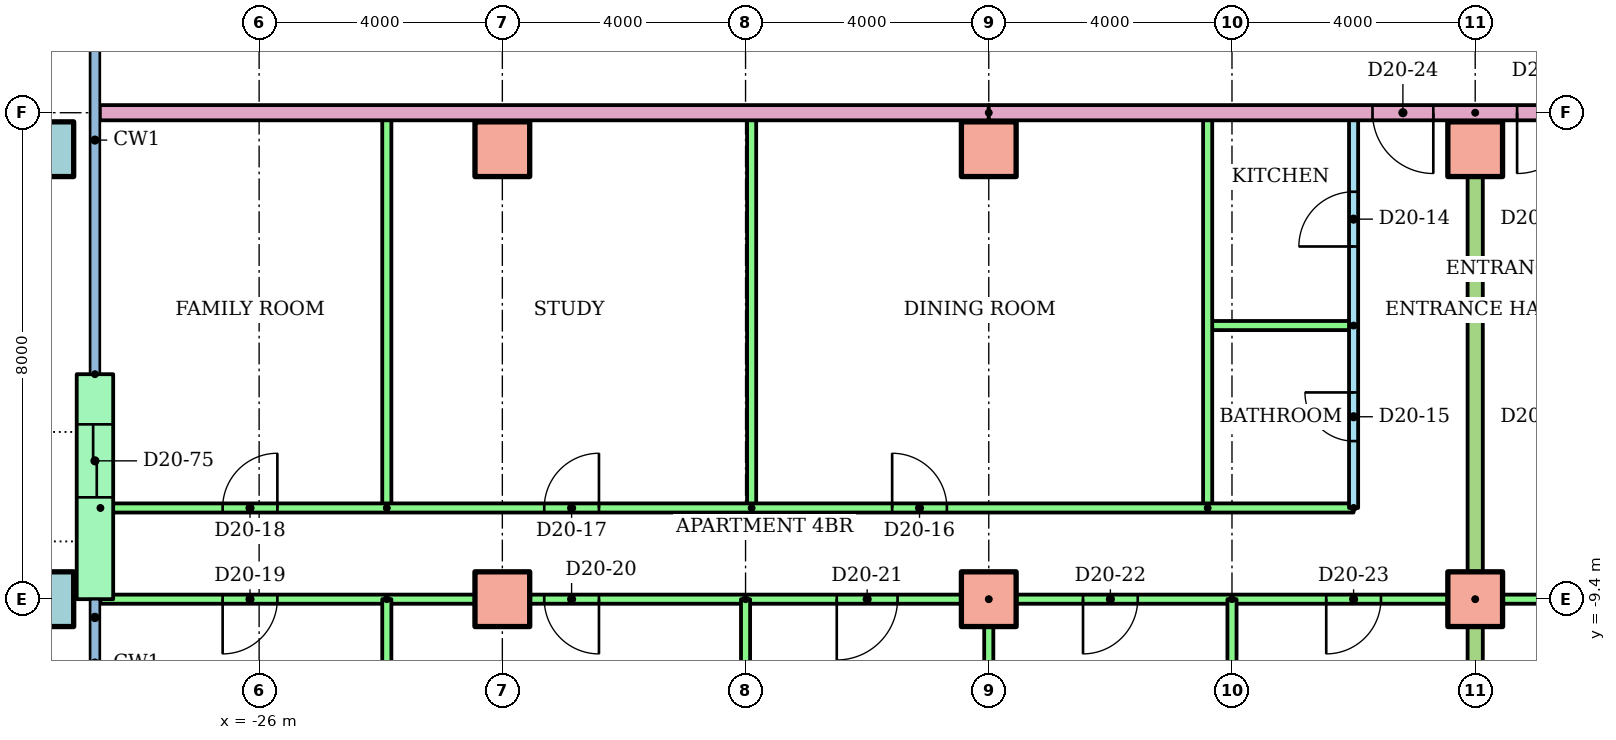
"""IFC4 building model, lengths in metres.
Left out: names, types, materials, properties, quantities, classifications, styles, units other than length and angle.
Written with IfcOpenShell. Run it as: python <this file> out.ifc"""

import sys

from ifc_helpers import new_model, si_unit, direction, frame, frame_2d, origin, origin_2d, place, context, subcontext, project, spatial, rectangle, hollow_rectangle, extrude, element, fill, save


model = new_model("IFC4")
c1 = context("Model", 3, precision=1e-05, world=origin(), true_north=direction((0.0, 1.0)))
c2 = subcontext(c1, "Body", "Model", "MODEL_VIEW")
j1 = project(units=[si_unit("LENGTHUNIT", "METRE"), si_unit("PLANEANGLEUNIT", "RADIAN")], contexts=[c1])
p1 = place(None, origin())
s1 = spatial("IfcSite", under=j1, at=p1, CompositionType="ELEMENT")
p2 = place(p1, origin())
s2 = spatial("IfcBuilding", under=s1, at=p2, CompositionType="ELEMENT")
p3 = place(p2, frame((0.0, 0.0, 80.7)))
s3 = spatial("IfcBuildingStorey", under=s2, at=p3, CompositionType="ELEMENT", Elevation=80.7)
p4 = place(p3, frame((-29.5, -9.4, 0.0)))
e1 = element("IfcColumn", 1, at=p4, inside=s3, PredefinedType="COLUMN", context=c2, shape_type="SweptSolid", body=[
    extrude(hollow_rectangle(XDim=0.9, YDim=0.9, WallThickness=0.045, at=origin_2d()), origin(), (0.0, 0.0, 1.0), 3.2),
])
for number, where in (
    (2, (-22.0, -9.4, 0.0)),
    (3, (-14.0, -9.4, 0.0)),
    (4, (-6.0, -9.4, 0.0)),
):
    element("IfcColumn", number, at=place(p3, frame(where)), inside=s3, PredefinedType="COLUMN", context=c2, shape_type="SweptSolid", body=[
        extrude(rectangle(XDim=0.9, YDim=0.9, at=origin_2d()), origin(), (0.0, 0.0, 1.0), 3.2),
    ])
p5 = place(p3, frame((-29.5, -2.0, 0.0)))
e5 = element("IfcColumn", 5, at=p5, inside=s3, PredefinedType="COLUMN", context=c2, shape_type="SweptSolid", body=[
    extrude(hollow_rectangle(XDim=0.9, YDim=0.9, WallThickness=0.045, at=origin_2d()), origin(), (0.0, 0.0, 1.0), 3.2),
])
for number, where in (
    (6, (-22.0, -2.0, 0.0)),
    (7, (-14.0, -2.0, 0.0)),
    (8, (-6.0, -2.0, 0.0)),
):
    element("IfcColumn", number, at=place(p3, frame(where)), inside=s3, PredefinedType="COLUMN", context=c2, shape_type="SweptSolid", body=[
        extrude(rectangle(XDim=0.9, YDim=0.9, at=origin_2d()), origin(), (0.0, 0.0, 1.0), 3.2),
    ])
p6 = place(p3, frame((-28.7, -5.7, 0.0), z_axis=(0.0, 0.0, 1.0), x_axis=(0.0, -1.0, 0.0)))
e9 = element("IfcWall", 9, at=p6, inside=s3, PredefinedType="STANDARD", context=c2, shape_type="SweptSolid", body=[
    extrude(rectangle(XDim=3.7, YDim=0.6, at=frame_2d((1.85, 0.0))), origin(), (0.0, 0.0, 1.0), 2.92),
])
p7 = place(p6, frame((0.825, 0.0, 0.0)))
e10 = element("IfcOpeningElement", 10, at=p7, cuts=e9, PredefinedType="OPENING", context=c2, shape_type="SweptSolid", body=[
    extrude(rectangle(XDim=1.2, YDim=2.1, at=frame_2d((0.6, 1.05))), frame((0.0, 0.31, 0.0), z_axis=(0.0, -1.0, 0.0), x_axis=(1.0, 0.0, 0.0)), (0.0, 0.0, 1.0), 0.62),
])
p8 = place(p3, frame((-8.0, -7.9, 0.0), z_axis=(0.0, 0.0, 1.0), x_axis=(0.0, 1.0, 0.0)))
e11 = element("IfcWall", 11, at=p8, inside=s3, PredefinedType="PARTITIONING", context=c2, shape_type="SweptSolid", body=[
    extrude(rectangle(XDim=6.5, YDim=0.15, at=frame_2d((3.25, 0.0))), origin(), (0.0, 0.0, 1.0), 2.4),
])
p9 = place(p8, frame((4.3, 0.0, 0.0)))
e12 = element("IfcOpeningElement", 12, at=p9, cuts=e11, PredefinedType="OPENING", context=c2, shape_type="SweptSolid", body=[
    extrude(rectangle(XDim=0.9, YDim=2.1, at=frame_2d((0.45, 1.05))), frame((0.0, 0.085, 0.0), z_axis=(0.0, -1.0, 0.0), x_axis=(1.0, 0.0, 0.0)), (0.0, 0.0, 1.0), 0.17),
])
p10 = place(p8, frame((1.1, 0.0, 0.0)))
e13 = element("IfcOpeningElement", 13, at=p10, cuts=e11, PredefinedType="OPENING", context=c2, shape_type="SweptSolid", body=[
    extrude(rectangle(XDim=0.8, YDim=2.1, at=frame_2d((0.4, 1.05))), frame((0.0, 0.085, 0.0), z_axis=(0.0, -1.0, 0.0), x_axis=(1.0, 0.0, 0.0)), (0.0, 0.0, 1.0), 0.17),
])
p11 = place(p3, frame((-8.0, -4.9, 0.0), z_axis=(0.0, 0.0, 1.0), x_axis=(-1.0, 0.0, 0.0)))
e14 = element("IfcWall", 14, at=p11, inside=s3, PredefinedType="PARTITIONING", context=c2, shape_type="SweptSolid", body=[
    extrude(rectangle(XDim=2.4, YDim=0.15, at=frame_2d((1.2, 0.0))), origin(), (0.0, 0.0, 1.0), 2.4),
])
for number, where, z_axis, x_axis in (
    (15, (-10.4, -7.9, 0.0), (0.0, 0.0, 1.0), (0.0, 1.0, 0.0)),
    (16, (-17.9, -7.9, 0.0), (0.0, 0.0, 1.0), (0.0, 1.0, 0.0)),
    (17, (-23.9, -7.9, 0.0), (0.0, 0.0, 1.0), (0.0, 1.0, 0.0)),
):
    element("IfcWall", number, at=place(p3, frame(where, z_axis=z_axis, x_axis=x_axis)), inside=s3, PredefinedType="PARTITIONING", context=c2, shape_type="SweptSolid", body=[
        extrude(rectangle(XDim=6.5, YDim=0.15, at=frame_2d((3.25, 0.0))), origin(), (0.0, 0.0, 1.0), 2.4),
    ])
p12 = place(p3, frame((-28.61, -7.9, 0.0)))
e18 = element("IfcWall", 18, at=p12, inside=s3, PredefinedType="PARTITIONING", context=c2, shape_type="SweptSolid", body=[
    extrude(rectangle(XDim=20.61, YDim=0.15, at=frame_2d((10.305, 0.0))), origin(), (0.0, 0.0, 1.0), 2.4),
])
p13 = place(p12, frame((13.021, 0.0, 0.0)))
e19 = element("IfcOpeningElement", 19, at=p13, cuts=e18, PredefinedType="OPENING", context=c2, shape_type="SweptSolid", body=[
    extrude(rectangle(XDim=0.9, YDim=2.1, at=frame_2d((0.45, 1.05))), frame((0.0, 0.085, 0.0), z_axis=(0.0, -1.0, 0.0), x_axis=(1.0, 0.0, 0.0)), (0.0, 0.0, 1.0), 0.17),
])
p14 = place(p12, frame((7.299, 0.0, 0.0)))
e20 = element("IfcOpeningElement", 20, at=p14, cuts=e18, PredefinedType="OPENING", context=c2, shape_type="SweptSolid", body=[
    extrude(rectangle(XDim=0.9, YDim=2.1, at=frame_2d((0.45, 1.05))), frame((0.0, 0.085, 0.0), z_axis=(0.0, -1.0, 0.0), x_axis=(1.0, 0.0, 0.0)), (0.0, 0.0, 1.0), 0.17),
])
p15 = place(p12, frame((2.01, 0.0, 0.0)))
e21 = element("IfcOpeningElement", 21, at=p15, cuts=e18, PredefinedType="OPENING", context=c2, shape_type="SweptSolid", body=[
    extrude(rectangle(XDim=0.9, YDim=2.1, at=frame_2d((0.45, 1.05))), frame((0.0, 0.085, 0.0), z_axis=(0.0, -1.0, 0.0), x_axis=(1.0, 0.0, 0.0)), (0.0, 0.0, 1.0), 0.17),
])
p16 = place(p3, frame((-6.0, -9.4, 0.0), z_axis=(0.0, 0.0, 1.0), x_axis=(-1.0, 0.0, 0.0)))
e22 = element("IfcWall", 22, at=p16, inside=s3, PredefinedType="PARTITIONING", context=c2, shape_type="SweptSolid", body=[
    extrude(rectangle(XDim=22.61, YDim=0.15, at=frame_2d((11.305, 0.0))), origin(), (0.0, 0.0, 1.0), 2.4),
])
p17 = place(p16, frame((19.7, 0.0, 0.0)))
e23 = element("IfcOpeningElement", 23, at=p17, cuts=e22, PredefinedType="OPENING", context=c2, shape_type="SweptSolid", body=[
    extrude(rectangle(XDim=0.9, YDim=2.1, at=frame_2d((0.45, 1.05))), frame((0.0, 0.085, 0.0), z_axis=(0.0, -1.0, 0.0), x_axis=(1.0, 0.0, 0.0)), (0.0, 0.0, 1.0), 0.17),
])
p18 = place(p16, frame((14.411, 0.0, 0.0)))
e24 = element("IfcOpeningElement", 24, at=p18, cuts=e22, PredefinedType="OPENING", context=c2, shape_type="SweptSolid", body=[
    extrude(rectangle(XDim=0.9, YDim=2.1, at=frame_2d((0.45, 1.05))), frame((0.0, 0.085, 0.0), z_axis=(0.0, -1.0, 0.0), x_axis=(1.0, 0.0, 0.0)), (0.0, 0.0, 1.0), 0.17),
])
p19 = place(p16, frame((9.5, 0.0, 0.0)))
e25 = element("IfcOpeningElement", 25, at=p19, cuts=e22, PredefinedType="OPENING", context=c2, shape_type="SweptSolid", body=[
    extrude(rectangle(XDim=1.0, YDim=2.1, at=frame_2d((0.5, 1.05))), frame((0.0, 0.085, 0.0), z_axis=(0.0, -1.0, 0.0), x_axis=(1.0, 0.0, 0.0)), (0.0, 0.0, 1.0), 0.17),
])
p20 = place(p16, frame((5.55, 0.0, 0.0)))
e26 = element("IfcOpeningElement", 26, at=p20, cuts=e22, PredefinedType="OPENING", context=c2, shape_type="SweptSolid", body=[
    extrude(rectangle(XDim=0.9, YDim=2.1, at=frame_2d((0.45, 1.05))), frame((0.0, 0.085, 0.0), z_axis=(0.0, -1.0, 0.0), x_axis=(1.0, 0.0, 0.0)), (0.0, 0.0, 1.0), 0.17),
])
p21 = place(p16, frame((1.55, 0.0, 0.0)))
e27 = element("IfcOpeningElement", 27, at=p21, cuts=e22, PredefinedType="OPENING", context=c2, shape_type="SweptSolid", body=[
    extrude(rectangle(XDim=0.9, YDim=2.1, at=frame_2d((0.45, 1.05))), frame((0.0, 0.085, 0.0), z_axis=(0.0, -1.0, 0.0), x_axis=(1.0, 0.0, 0.0)), (0.0, 0.0, 1.0), 0.17),
])
p22 = place(p3, frame((-23.9, -9.4, 0.0), z_axis=(0.0, 0.0, 1.0), x_axis=(0.0, -1.0, 0.0)))
e28 = element("IfcWall", 28, at=p22, inside=s3, PredefinedType="PARTITIONING", context=c2, shape_type="SweptSolid", body=[
    extrude(rectangle(XDim=5.02, YDim=0.15, at=frame_2d((2.51, 0.0))), origin(), (0.0, 0.0, 1.0), 2.4),
])
p23 = place(p3, frame((-18.0, -9.4, 0.0), z_axis=(0.0, 0.0, 1.0), x_axis=(0.0, -1.0, 0.0)))
e29 = element("IfcWall", 29, at=p23, inside=s3, PredefinedType="PARTITIONING", context=c2, shape_type="SweptSolid", body=[
    extrude(rectangle(XDim=6.821, YDim=0.15, at=frame_2d((3.411, 0.0))), origin(), (0.0, 0.0, 1.0), 2.4),
])
p24 = place(p3, frame((-14.0, -9.4, 0.0), z_axis=(0.0, 0.0, 1.0), x_axis=(0.0, -1.0, 0.0)))
e30 = element("IfcWall", 30, at=p24, inside=s3, PredefinedType="PARTITIONING", context=c2, shape_type="SweptSolid", body=[
    extrude(rectangle(XDim=6.81, YDim=0.15, at=frame_2d((3.405, 0.0))), origin(), (0.0, 0.0, 1.0), 2.4),
])
p25 = place(p3, frame((-10.0, -9.4, 0.0), z_axis=(0.0, 0.0, 1.0), x_axis=(0.0, -1.0, 0.0)))
e31 = element("IfcWall", 31, at=p25, inside=s3, PredefinedType="PARTITIONING", context=c2, shape_type="SweptSolid", body=[
    extrude(rectangle(XDim=6.821, YDim=0.15, at=frame_2d((3.411, 0.0))), origin(), (0.0, 0.0, 1.0), 2.4),
])
p26 = place(p3, frame((10.0, -9.4, 0.0), z_axis=(0.0, 0.0, 1.0), x_axis=(-1.0, 0.0, 0.0)))
e32 = element("IfcWall", 32, at=p26, inside=s3, PredefinedType="PARTITIONING", context=c2, shape_type="SweptSolid", body=[
    extrude(rectangle(XDim=16.0, YDim=0.15, at=frame_2d((8.0, 0.0))), origin(), (0.0, 0.0, 1.0), 2.4),
])
p27 = place(p26, frame((13.55, 0.0, 0.0)))
e33 = element("IfcOpeningElement", 33, at=p27, cuts=e32, PredefinedType="OPENING", context=c2, shape_type="SweptSolid", body=[
    extrude(rectangle(XDim=0.9, YDim=2.1, at=frame_2d((0.45, 1.05))), frame((0.0, 0.085, 0.0), z_axis=(0.0, -1.0, 0.0), x_axis=(1.0, 0.0, 0.0)), (0.0, 0.0, 1.0), 0.17),
])
p28 = place(p26, frame((9.5, 0.0, 0.0)))
e34 = element("IfcOpeningElement", 34, at=p28, cuts=e32, PredefinedType="OPENING", context=c2, shape_type="SweptSolid", body=[
    extrude(rectangle(XDim=1.0, YDim=2.1, at=frame_2d((0.5, 1.05))), frame((0.0, 0.085, 0.0), z_axis=(0.0, -1.0, 0.0), x_axis=(1.0, 0.0, 0.0)), (0.0, 0.0, 1.0), 0.17),
])
p29 = place(p26, frame((5.55, 0.0, 0.0)))
e35 = element("IfcOpeningElement", 35, at=p29, cuts=e32, PredefinedType="OPENING", context=c2, shape_type="SweptSolid", body=[
    extrude(rectangle(XDim=0.9, YDim=2.1, at=frame_2d((0.45, 1.05))), frame((0.0, 0.085, 0.0), z_axis=(0.0, -1.0, 0.0), x_axis=(1.0, 0.0, 0.0)), (0.0, 0.0, 1.0), 0.17),
])
p30 = place(p26, frame((1.55, 0.0, 0.0)))
e36 = element("IfcOpeningElement", 36, at=p30, cuts=e32, PredefinedType="OPENING", context=c2, shape_type="SweptSolid", body=[
    extrude(rectangle(XDim=0.9, YDim=2.1, at=frame_2d((0.45, 1.05))), frame((0.0, 0.085, 0.0), z_axis=(0.0, -1.0, 0.0), x_axis=(1.0, 0.0, 0.0)), (0.0, 0.0, 1.0), 0.17),
])
p31 = place(p3, frame((-6.0, -1.4, 0.0), z_axis=(0.0, 0.0, 1.0), x_axis=(0.0, -1.0, 0.0)))
e37 = element("IfcWall", 37, at=p31, inside=s3, PredefinedType="PARTITIONING", context=c2, shape_type="SweptSolid", body=[
    extrude(rectangle(XDim=14.81, YDim=0.25, at=frame_2d((7.405, 0.0))), origin(), (0.0, 0.0, 1.0), 2.4),
])
p32 = place(p3, frame((-14.0, -1.4, 0.0), z_axis=(0.0, 0.0, 1.0), x_axis=(-1.0, 0.0, 0.0)))
e38 = element("IfcWall", 38, at=p32, inside=s3, PredefinedType="PARTITIONING", context=c2, shape_type="SweptSolid", body=[
    extrude(rectangle(XDim=14.62, YDim=0.25, at=frame_2d((7.31, 0.0))), origin(), (0.0, 0.0, 1.0), 2.4),
])
p33 = place(p3, frame((14.0, -1.4, 0.0), z_axis=(0.0, 0.0, 1.0), x_axis=(-1.0, 0.0, 0.0)))
e39 = element("IfcWall", 39, at=p33, inside=s3, PredefinedType="PARTITIONING", context=c2, shape_type="SweptSolid", body=[
    extrude(rectangle(XDim=28.0, YDim=0.25, at=frame_2d((14.0, 0.0))), origin(), (0.0, 0.0, 1.0), 2.4),
])
p34 = place(p33, frame((20.689, 0.0, 0.0)))
e40 = element("IfcOpeningElement", 40, at=p34, cuts=e39, PredefinedType="OPENING", context=c2, shape_type="SweptSolid", body=[
    extrude(rectangle(XDim=1.0, YDim=2.1, at=frame_2d((0.5, 1.05))), frame((0.0, 0.135, 0.0), z_axis=(0.0, -1.0, 0.0), x_axis=(1.0, 0.0, 0.0)), (0.0, 0.0, 1.0), 0.27),
])
p35 = place(p33, frame((18.311, 0.0, 0.0)))
e41 = element("IfcOpeningElement", 41, at=p35, cuts=e39, PredefinedType="OPENING", context=c2, shape_type="SweptSolid", body=[
    extrude(rectangle(XDim=1.0, YDim=2.1, at=frame_2d((0.5, 1.05))), frame((0.0, 0.135, 0.0), z_axis=(0.0, -1.0, 0.0), x_axis=(1.0, 0.0, 0.0)), (0.0, 0.0, 1.0), 0.27),
])
p36 = place(p33, frame((2.311, 0.0, 0.0)))
e42 = element("IfcOpeningElement", 42, at=p36, cuts=e39, PredefinedType="OPENING", context=c2, shape_type="SweptSolid", body=[
    extrude(rectangle(XDim=1.0, YDim=2.1, at=frame_2d((0.5, 1.05))), frame((0.0, 0.135, 0.0), z_axis=(0.0, -1.0, 0.0), x_axis=(1.0, 0.0, 0.0)), (0.0, 0.0, 1.0), 0.27),
])
p37 = place(p9, origin())
e43 = element("IfcDoor", 43, at=p37, inside=s3, OperationType="SINGLE_SWING_LEFT", PredefinedType="DOOR", context=c2, shape_type="SweptSolid", body=[
    extrude(rectangle(XDim=0.9, YDim=2.1, at=frame_2d((0.45, 1.05))), frame((0.0, 0.025, 0.0), z_axis=(0.0, -1.0, 0.0), x_axis=(1.0, 0.0, 0.0)), (0.0, 0.0, 1.0), 0.05),
])
fill(e12, e43)
p38 = place(p10, origin())
e44 = element("IfcDoor", 44, at=p38, inside=s3, OperationType="SINGLE_SWING_RIGHT", PredefinedType="DOOR", context=c2, shape_type="SweptSolid", body=[
    extrude(rectangle(XDim=0.8, YDim=2.1, at=frame_2d((0.4, 1.05))), frame((0.0, 0.025, 0.0), z_axis=(0.0, -1.0, 0.0), x_axis=(1.0, 0.0, 0.0)), (0.0, 0.0, 1.0), 0.05),
])
fill(e13, e44)
p39 = place(p13, origin())
e45 = element("IfcDoor", 45, at=p39, inside=s3, OperationType="SINGLE_SWING_LEFT", PredefinedType="DOOR", context=c2, shape_type="SweptSolid", body=[
    extrude(rectangle(XDim=0.9, YDim=2.1, at=frame_2d((0.45, 1.05))), frame((0.0, 0.025, 0.0), z_axis=(0.0, -1.0, 0.0), x_axis=(1.0, 0.0, 0.0)), (0.0, 0.0, 1.0), 0.05),
])
fill(e19, e45)
p40 = place(p14, origin())
e46 = element("IfcDoor", 46, at=p40, inside=s3, OperationType="SINGLE_SWING_RIGHT", PredefinedType="DOOR", context=c2, shape_type="SweptSolid", body=[
    extrude(rectangle(XDim=0.9, YDim=2.1, at=frame_2d((0.45, 1.05))), frame((0.0, 0.025, 0.0), z_axis=(0.0, -1.0, 0.0), x_axis=(1.0, 0.0, 0.0)), (0.0, 0.0, 1.0), 0.05),
])
fill(e20, e46)
p41 = place(p15, origin())
e47 = element("IfcDoor", 47, at=p41, inside=s3, OperationType="SINGLE_SWING_RIGHT", PredefinedType="DOOR", context=c2, shape_type="SweptSolid", body=[
    extrude(rectangle(XDim=0.9, YDim=2.1, at=frame_2d((0.45, 1.05))), frame((0.0, 0.025, 0.0), z_axis=(0.0, -1.0, 0.0), x_axis=(1.0, 0.0, 0.0)), (0.0, 0.0, 1.0), 0.05),
])
fill(e21, e47)
p42 = place(p17, origin())
e48 = element("IfcDoor", 48, at=p42, inside=s3, OperationType="SINGLE_SWING_RIGHT", PredefinedType="DOOR", context=c2, shape_type="SweptSolid", body=[
    extrude(rectangle(XDim=0.9, YDim=2.1, at=frame_2d((0.45, 1.05))), frame((0.0, 0.025, 0.0), z_axis=(0.0, -1.0, 0.0), x_axis=(1.0, 0.0, 0.0)), (0.0, 0.0, 1.0), 0.05),
])
fill(e23, e48)
p43 = place(p18, origin())
e49 = element("IfcDoor", 49, at=p43, inside=s3, OperationType="SINGLE_SWING_LEFT", PredefinedType="DOOR", context=c2, shape_type="SweptSolid", body=[
    extrude(rectangle(XDim=0.9, YDim=2.1, at=frame_2d((0.45, 1.05))), frame((0.0, 0.025, 0.0), z_axis=(0.0, -1.0, 0.0), x_axis=(1.0, 0.0, 0.0)), (0.0, 0.0, 1.0), 0.05),
])
fill(e24, e49)
p44 = place(p19, origin())
e50 = element("IfcDoor", 50, at=p44, inside=s3, OperationType="SINGLE_SWING_RIGHT", PredefinedType="DOOR", context=c2, shape_type="SweptSolid", body=[
    extrude(rectangle(XDim=1.0, YDim=2.1, at=frame_2d((0.5, 1.05))), frame((0.0, 0.025, 0.0), z_axis=(0.0, -1.0, 0.0), x_axis=(1.0, 0.0, 0.0)), (0.0, 0.0, 1.0), 0.05),
])
fill(e25, e50)
p45 = place(p20, origin())
e51 = element("IfcDoor", 51, at=p45, inside=s3, OperationType="SINGLE_SWING_RIGHT", PredefinedType="DOOR", context=c2, shape_type="SweptSolid", body=[
    extrude(rectangle(XDim=0.9, YDim=2.1, at=frame_2d((0.45, 1.05))), frame((0.0, 0.025, 0.0), z_axis=(0.0, -1.0, 0.0), x_axis=(1.0, 0.0, 0.0)), (0.0, 0.0, 1.0), 0.05),
])
fill(e26, e51)
p46 = place(p21, origin())
e52 = element("IfcDoor", 52, at=p46, inside=s3, OperationType="SINGLE_SWING_RIGHT", PredefinedType="DOOR", context=c2, shape_type="SweptSolid", body=[
    extrude(rectangle(XDim=0.9, YDim=2.1, at=frame_2d((0.45, 1.05))), frame((0.0, 0.025, 0.0), z_axis=(0.0, -1.0, 0.0), x_axis=(1.0, 0.0, 0.0)), (0.0, 0.0, 1.0), 0.05),
])
fill(e27, e52)
p47 = place(p34, origin())
e53 = element("IfcDoor", 53, at=p47, inside=s3, OperationType="SINGLE_SWING_LEFT", PredefinedType="DOOR", context=c2, shape_type="SweptSolid", body=[
    extrude(rectangle(XDim=1.0, YDim=2.1, at=frame_2d((0.5, 1.05))), frame((0.0, 0.025, 0.0), z_axis=(0.0, -1.0, 0.0), x_axis=(1.0, 0.0, 0.0)), (0.0, 0.0, 1.0), 0.05),
])
fill(e40, e53)
p48 = place(p35, origin())
e54 = element("IfcDoor", 54, at=p48, inside=s3, OperationType="SINGLE_SWING_RIGHT", PredefinedType="DOOR", context=c2, shape_type="SweptSolid", body=[
    extrude(rectangle(XDim=1.0, YDim=2.1, at=frame_2d((0.5, 1.05))), frame((0.0, 0.025, 0.0), z_axis=(0.0, -1.0, 0.0), x_axis=(1.0, 0.0, 0.0)), (0.0, 0.0, 1.0), 0.05),
])
fill(e41, e54)
p49 = place(p7, origin())
e55 = element("IfcDoor", 55, at=p49, inside=s3, OperationType="SLIDING_TO_LEFT", PredefinedType="DOOR", context=c2, shape_type="SweptSolid", body=[
    extrude(rectangle(XDim=1.2, YDim=2.1, at=frame_2d((0.6, 1.05))), frame((0.0, 0.025, 0.0), z_axis=(0.0, -1.0, 0.0), x_axis=(1.0, 0.0, 0.0)), (0.0, 0.0, 1.0), 0.05),
])
fill(e10, e55)
save(model, sys.argv[1])
